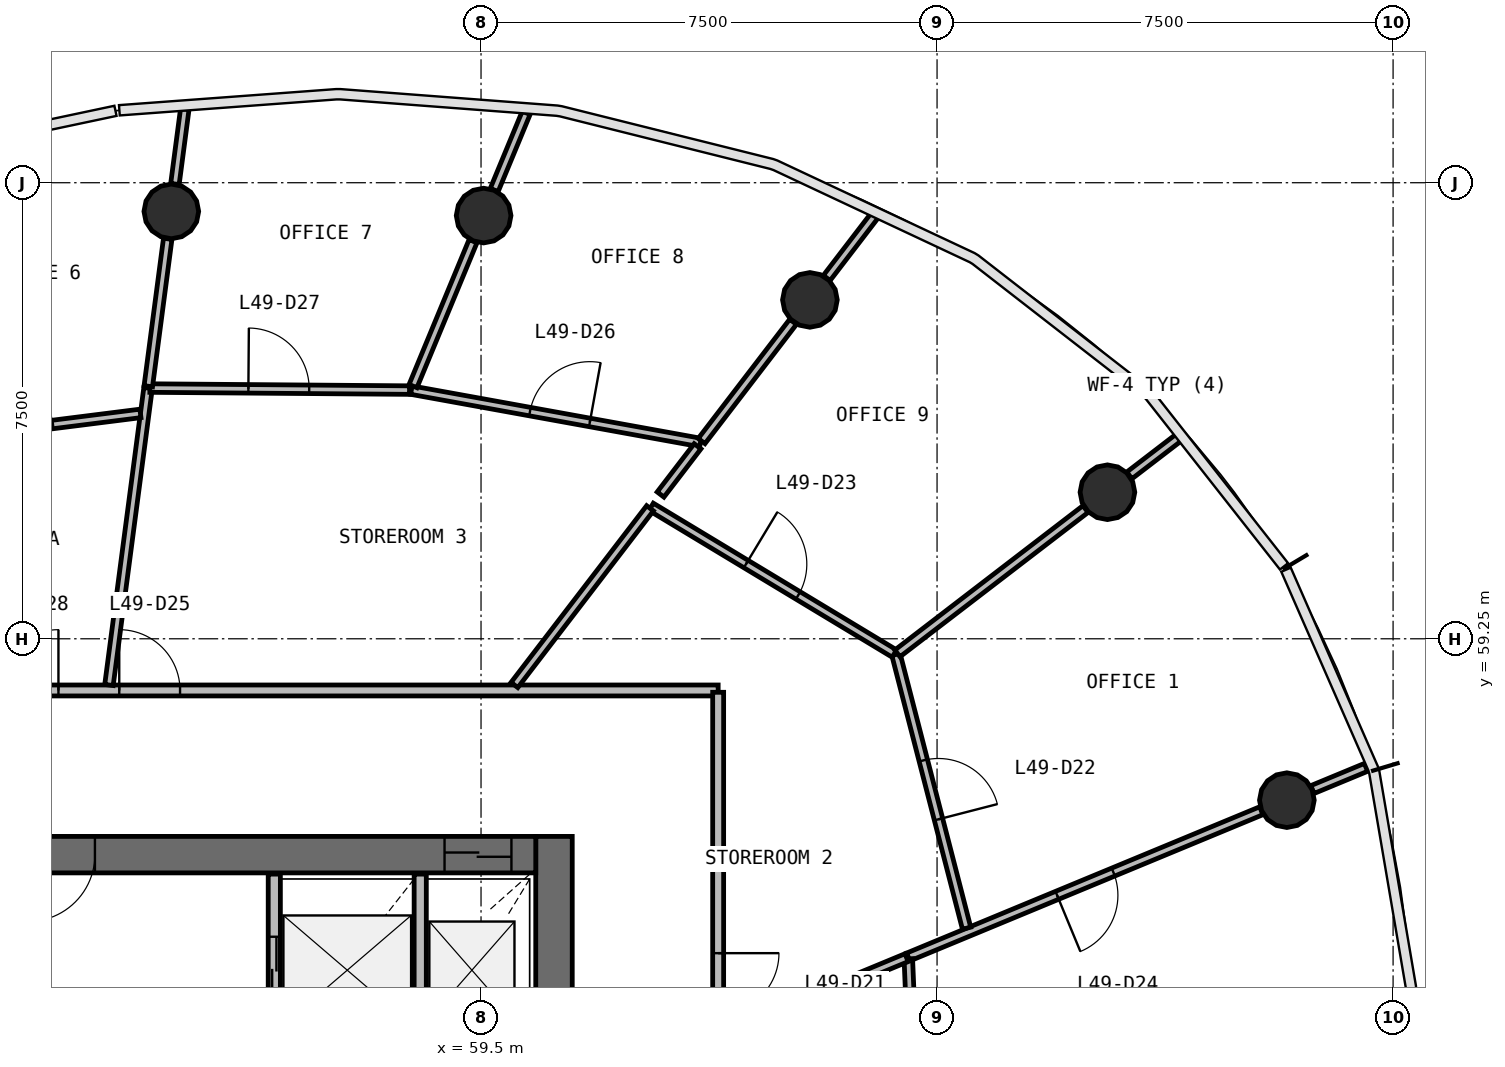
"""IFC4 building model, lengths in metres.
Left out: names, types, materials, properties, quantities, classifications, styles, units other than length and angle.
Written with IfcOpenShell. Run it as: python <this file> out.ifc"""

import sys

from ifc_helpers import new_model, si_unit, direction, frame, frame_2d, origin, origin_2d, place, context, subcontext, project, spatial, rectangle, circle, extrude, source, transform, mapped, element, fill, save


model = new_model("IFC4")
c1 = context("Model", 3, precision=1e-05, world=origin(), true_north=direction((0.0, 1.0)))
c2 = subcontext(c1, "Body", "Model", "MODEL_VIEW")
j1 = project(units=[si_unit("LENGTHUNIT", "METRE"), si_unit("PLANEANGLEUNIT", "RADIAN")], contexts=[c1])
p1 = place(None, origin())
s1 = spatial("IfcSite", under=j1, at=p1, CompositionType="ELEMENT")
p2 = place(p1, origin())
s2 = spatial("IfcBuilding", under=s1, at=p2, CompositionType="ELEMENT")
p3 = place(p2, frame((0.0, 0.0, 203.3)))
s3 = spatial("IfcBuildingStorey", under=s2, at=p3, CompositionType="ELEMENT", Elevation=203.3)
p4 = place(p3, frame((60.7, 40.0, 0.0), z_axis=(0.0, 0.0, 1.0), x_axis=(0.0, 1.0, 0.0)))
e1 = element("IfcWall", 1, at=p4, inside=s3, PredefinedType="SHEAR", context=c2, shape_type="SweptSolid", body=[
    extrude(rectangle(XDim=16.0, YDim=0.6, at=frame_2d((8.0, 0.0))), origin(), (0.0, 0.0, 1.0), 3.9),
])
p5 = place(p4, frame((7.1, 0.0, 0.0)))
e2 = element("IfcOpeningElement", 2, at=p5, cuts=e1, PredefinedType="OPENING", context=c2, shape_type="SweptSolid", body=[
    extrude(rectangle(XDim=1.8, YDim=2.1, at=frame_2d((0.9, 1.05))), frame((0.0, 0.31, 0.0), z_axis=(0.0, -1.0, 0.0), x_axis=(1.0, 0.0, 0.0)), (0.0, 0.0, 1.0), 0.62),
])
p6 = place(p3, frame((60.4, 55.7, 0.0), z_axis=(0.0, 0.0, 1.0), x_axis=(-1.0, 0.0, 0.0)))
e3 = element("IfcWall", 3, at=p6, inside=s3, PredefinedType="SHEAR", context=c2, shape_type="SweptSolid", body=[
    extrude(rectangle(XDim=16.8, YDim=0.6, at=frame_2d((8.4, 0.0))), origin(), (0.0, 0.0, 1.0), 3.9),
])
p7 = place(p6, frame((0.4, 0.0, 0.0)))
e4 = element("IfcOpeningElement", 4, at=p7, cuts=e3, PredefinedType="OPENING", context=c2, shape_type="SweptSolid", body=[
    extrude(rectangle(XDim=1.1, YDim=2.1, at=frame_2d((0.55, 1.05))), frame((0.0, 0.31, 0.0), z_axis=(0.0, -1.0, 0.0), x_axis=(1.0, 0.0, 0.0)), (0.0, 0.0, 1.0), 0.62),
])
p8 = place(p6, frame((10.3, 0.0, 0.0)))
e5 = element("IfcOpeningElement", 5, at=p8, cuts=e3, PredefinedType="OPENING", context=c2, shape_type="SweptSolid", body=[
    extrude(rectangle(XDim=1.2, YDim=2.1, at=frame_2d((0.6, 1.05))), frame((0.0, 0.31, 0.0), z_axis=(0.0, -1.0, 0.0), x_axis=(1.0, 0.0, 0.0)), (0.0, 0.0, 1.0), 0.62),
])
p9 = place(p6, frame((7.25, 0.0, 0.0)))
e6 = element("IfcOpeningElement", 6, at=p9, cuts=e3, PredefinedType="OPENING", context=c2, shape_type="SweptSolid", body=[
    extrude(rectangle(XDim=1.1, YDim=2.1, at=frame_2d((0.55, 1.05))), frame((0.0, 0.31, 0.0), z_axis=(0.0, -1.0, 0.0), x_axis=(1.0, 0.0, 0.0)), (0.0, 0.0, 1.0), 0.62),
])
m1 = source(origin(), c2, "Body", "SweptSolid", [
    extrude(circle(Radius=0.45, at=origin_2d()), origin(), (0.0, 0.0, 1.0), 3.9),
])
for number, where, z_axis, x_axis in (
    (7, (72.753, 56.596, 0.0), (0.0, 0.0, 1.0), (1.0, 0.0, 0.0)),
    (8, (69.802, 61.66, 0.0), (0.0, 0.0, 1.0), (1.0, 0.0, 0.0)),
    (9, (64.909, 64.823, 0.0), (0.0, 0.0, 1.0), (1.0, 0.0, 0.0)),
    (10, (59.543, 66.21, 0.0), (0.0, 0.0, 1.0), (1.0, 0.0, 0.0)),
    (11, (54.406, 66.278, 0.0), (0.0, 0.0, 1.0), (1.0, 0.0, 0.0)),
):
    element("IfcColumn", number, at=place(p3, frame(where, z_axis=z_axis, x_axis=x_axis)), inside=s3, PredefinedType="COLUMN", context=c2, shape_type="MappedRepresentation", body=[
        mapped(m1, transform((0.0, 0.0, 0.0), scale=1.0)),
    ])
p10 = place(p3, frame((56.1, 55.38, 0.0), z_axis=(0.0, 0.0, 1.0), x_axis=(0.0, -1.0, 0.0)))
e12 = element("IfcWall", 12, at=p10, inside=s3, PredefinedType="SOLIDWALL", context=c2, shape_type="SweptSolid", body=[
    extrude(rectangle(XDim=2.98, YDim=0.2, at=frame_2d((1.49, 0.0))), origin(), (0.0, 0.0, 1.0), 3.58),
])
p11 = place(p10, frame((1.03, 0.0, 0.0)))
e13 = element("IfcOpeningElement", 13, at=p11, cuts=e12, PredefinedType="OPENING", context=c2, shape_type="SweptSolid", body=[
    extrude(rectangle(XDim=1.1, YDim=2.1, at=frame_2d((0.55, 1.05))), frame((0.0, 0.11, 0.0), z_axis=(0.0, -1.0, 0.0), x_axis=(1.0, 0.0, 0.0)), (0.0, 0.0, 1.0), 0.22),
])
p12 = place(p3, frame((58.5, 52.4, 0.0), z_axis=(0.0, 0.0, 1.0), x_axis=(0.0, 1.0, 0.0)))
e14 = element("IfcWall", 14, at=p12, inside=s3, PredefinedType="SOLIDWALL", context=c2, shape_type="SweptSolid", body=[
    extrude(rectangle(XDim=2.98, YDim=0.2, at=frame_2d((1.49, 0.0))), origin(), (0.0, 0.0, 1.0), 3.58),
])
p13 = place(p3, frame((40.6, 58.4, 0.0), z_axis=(0.0, 0.0, 1.0), x_axis=(1.0, 0.0, 0.0)))
e15 = element("IfcWall", 15, at=p13, inside=s3, PredefinedType="PARTITIONING", context=c2, shape_type="SweptSolid", body=[
    extrude(rectangle(XDim=22.8, YDim=0.18, at=frame_2d((11.4, 0.0))), origin(), (0.0, 0.0, 1.0), 2.88),
])
p14 = place(p13, frame((12.95, 0.0, 0.0)))
e16 = element("IfcOpeningElement", 16, at=p14, cuts=e15, PredefinedType="OPENING", context=c2, shape_type="SweptSolid", body=[
    extrude(rectangle(XDim=1.0, YDim=2.1, at=frame_2d((0.5, 1.05))), frame((0.0, 0.1, 0.0), z_axis=(0.0, -1.0, 0.0), x_axis=(1.0, 0.0, 0.0)), (0.0, 0.0, 1.0), 0.2),
])
p15 = place(p13, frame((10.95, 0.0, 0.0)))
e17 = element("IfcOpeningElement", 17, at=p15, cuts=e15, PredefinedType="OPENING", context=c2, shape_type="SweptSolid", body=[
    extrude(rectangle(XDim=1.0, YDim=2.1, at=frame_2d((0.5, 1.05))), frame((0.0, 0.1, 0.0), z_axis=(0.0, -1.0, 0.0), x_axis=(1.0, 0.0, 0.0)), (0.0, 0.0, 1.0), 0.2),
])
p16 = place(p3, frame((63.4, 58.37, 0.0), z_axis=(0.0, 0.0, 1.0), x_axis=(0.0, -1.0, 0.0)))
e18 = element("IfcWall", 18, at=p16, inside=s3, PredefinedType="PARTITIONING", context=c2, shape_type="SweptSolid", body=[
    extrude(rectangle(XDim=20.74, YDim=0.18, at=frame_2d((10.37, 0.0))), origin(), (0.0, 0.0, 1.0), 2.88),
])
p17 = place(p16, frame((9.99, 0.0, 0.0)))
e19 = element("IfcOpeningElement", 19, at=p17, cuts=e18, PredefinedType="OPENING", context=c2, shape_type="SweptSolid", body=[
    extrude(rectangle(XDim=0.9, YDim=2.1, at=frame_2d((0.45, 1.05))), frame((0.0, 0.1, 0.0), z_axis=(0.0, -1.0, 0.0), x_axis=(1.0, 0.0, 0.0)), (0.0, 0.0, 1.0), 0.2),
])
p18 = place(p16, frame((7.79, 0.0, 0.0)))
e20 = element("IfcOpeningElement", 20, at=p18, cuts=e18, PredefinedType="OPENING", context=c2, shape_type="SweptSolid", body=[
    extrude(rectangle(XDim=0.9, YDim=2.1, at=frame_2d((0.45, 1.05))), frame((0.0, 0.1, 0.0), z_axis=(0.0, -1.0, 0.0), x_axis=(1.0, 0.0, 0.0)), (0.0, 0.0, 1.0), 0.2),
])
p19 = place(p16, frame((4.29, 0.0, 0.0)))
e21 = element("IfcOpeningElement", 21, at=p19, cuts=e18, PredefinedType="OPENING", context=c2, shape_type="SweptSolid", body=[
    extrude(rectangle(XDim=1.0, YDim=2.1, at=frame_2d((0.5, 1.05))), frame((0.0, 0.1, 0.0), z_axis=(0.0, -1.0, 0.0), x_axis=(1.0, 0.0, 0.0)), (0.0, 0.0, 1.0), 0.2),
])
p20 = place(p16, frame((15.49, 0.0, 0.0)))
e22 = element("IfcOpeningElement", 22, at=p20, cuts=e18, PredefinedType="OPENING", context=c2, shape_type="SweptSolid", body=[
    extrude(rectangle(XDim=1.0, YDim=2.1, at=frame_2d((0.5, 1.05))), frame((0.0, 0.1, 0.0), z_axis=(0.0, -1.0, 0.0), x_axis=(1.0, 0.0, 0.0)), (0.0, 0.0, 1.0), 0.2),
])
p21 = place(p16, frame((12.09, 0.0, 0.0)))
e23 = element("IfcOpeningElement", 23, at=p21, cuts=e18, PredefinedType="OPENING", context=c2, shape_type="SweptSolid", body=[
    extrude(rectangle(XDim=1.0, YDim=2.1, at=frame_2d((0.5, 1.05))), frame((0.0, 0.1, 0.0), z_axis=(0.0, -1.0, 0.0), x_axis=(1.0, 0.0, 0.0)), (0.0, 0.0, 1.0), 0.2),
])
p22 = place(p3, frame((72.333, 56.422, 0.0), z_axis=(0.0, 0.0, 1.0), x_axis=(-0.92388853292, -0.382661702733, 0.0)))
e24 = element("IfcWall", 24, at=p22, inside=s3, PredefinedType="PARTITIONING", context=c2, shape_type="SweptSolid", body=[
    extrude(rectangle(XDim=6.285, YDim=0.14, at=frame_2d((3.143, 0.0))), origin(), (0.0, 0.0, 1.0), 2.88),
])
p23 = place(p22, frame((2.635, 0.0, 0.0)))
e25 = element("IfcOpeningElement", 25, at=p23, cuts=e24, PredefinedType="OPENING", context=c2, shape_type="SweptSolid", body=[
    extrude(rectangle(XDim=1.0, YDim=2.1, at=frame_2d((0.5, 1.05))), frame((0.0, 0.08, 0.0), z_axis=(0.0, -1.0, 0.0), x_axis=(1.0, 0.0, 0.0)), (0.0, 0.0, 1.0), 0.16),
])
p24 = place(p3, frame((53.381, 58.49, 0.0), z_axis=(0.0, 0.0, 1.0), x_axis=(0.130510929427, 0.991446870639, 0.0)))
e26 = element("IfcWall", 26, at=p24, inside=s3, PredefinedType="PARTITIONING", context=c2, shape_type="SweptSolid", body=[
    extrude(rectangle(XDim=4.926, YDim=0.14, at=frame_2d((2.463, 0.0))), origin(), (0.0, 0.0, 1.0), 2.88),
])
p25 = place(p3, frame((58.354, 63.339, 0.0), z_axis=(0.0, 0.0, 1.0), x_axis=(0.983980456021, -0.178276364581, 0.0)))
e27 = element("IfcWall", 27, at=p25, inside=s3, PredefinedType="PARTITIONING", context=c2, shape_type="SweptSolid", body=[
    extrude(rectangle(XDim=4.833, YDim=0.14, at=frame_2d((2.417, 0.0))), origin(), (0.0, 0.0, 1.0), 2.88),
])
p26 = place(p25, frame((1.983, 0.0, 0.0)))
e28 = element("IfcOpeningElement", 28, at=p26, cuts=e27, PredefinedType="OPENING", context=c2, shape_type="SweptSolid", body=[
    extrude(rectangle(XDim=1.0, YDim=2.1, at=frame_2d((0.5, 1.05))), frame((0.0, 0.08, 0.0), z_axis=(0.0, -1.0, 0.0), x_axis=(1.0, 0.0, 0.0)), (0.0, 0.0, 1.0), 0.16),
])
p27 = place(p3, frame((66.324, 58.991, 0.0), z_axis=(0.0, 0.0, 1.0), x_axis=(0.249819251726, -0.968292487561, 0.0)))
e29 = element("IfcWall", 29, at=p27, inside=s3, PredefinedType="PARTITIONING", context=c2, shape_type="SweptSolid", body=[
    extrude(rectangle(XDim=4.649, YDim=0.14, at=frame_2d((2.324, 0.0))), origin(), (0.0, 0.0, 1.0), 2.88),
])
p28 = place(p27, frame((1.799, 0.0, 0.0)))
e30 = element("IfcOpeningElement", 30, at=p28, cuts=e29, PredefinedType="OPENING", context=c2, shape_type="SweptSolid", body=[
    extrude(rectangle(XDim=1.0, YDim=2.1, at=frame_2d((0.5, 1.05))), frame((0.0, 0.08, 0.0), z_axis=(0.0, -1.0, 0.0), x_axis=(1.0, 0.0, 0.0)), (0.0, 0.0, 1.0), 0.16),
])
p29 = place(p3, frame((62.298, 61.42, 0.0), z_axis=(0.0, 0.0, 1.0), x_axis=(0.856310382511, -0.516461546298, 0.0)))
e31 = element("IfcWall", 31, at=p29, inside=s3, PredefinedType="PARTITIONING", context=c2, shape_type="SweptSolid", body=[
    extrude(rectangle(XDim=4.672, YDim=0.14, at=frame_2d((2.336, 0.0))), origin(), (0.0, 0.0, 1.0), 2.88),
])
p30 = place(p29, frame((1.823, 0.0, 0.0)))
e32 = element("IfcOpeningElement", 32, at=p30, cuts=e31, PredefinedType="OPENING", context=c2, shape_type="SweptSolid", body=[
    extrude(rectangle(XDim=1.0, YDim=2.1, at=frame_2d((0.5, 1.05))), frame((0.0, 0.08, 0.0), z_axis=(0.0, -1.0, 0.0), x_axis=(1.0, 0.0, 0.0)), (0.0, 0.0, 1.0), 0.16),
])
p31 = place(p3, frame((54.054, 63.373, 0.0), z_axis=(0.0, 0.0, 1.0), x_axis=(0.999969319587, -0.007833255005, 0.0)))
e33 = element("IfcWall", 33, at=p31, inside=s3, PredefinedType="PARTITIONING", context=c2, shape_type="SweptSolid", body=[
    extrude(rectangle(XDim=4.27, YDim=0.14, at=frame_2d((2.135, 0.0))), origin(), (0.0, 0.0, 1.0), 2.88),
])
p32 = place(p31, frame((1.62, 0.0, 0.0)))
e34 = element("IfcOpeningElement", 34, at=p32, cuts=e33, PredefinedType="OPENING", context=c2, shape_type="SweptSolid", body=[
    extrude(rectangle(XDim=1.0, YDim=2.1, at=frame_2d((0.5, 1.05))), frame((0.0, 0.08, 0.0), z_axis=(0.0, -1.0, 0.0), x_axis=(1.0, 0.0, 0.0)), (0.0, 0.0, 1.0), 0.16),
])
p33 = place(p3, frame((66.696, 49.935, 0.0), z_axis=(0.0, 0.0, 1.0), x_axis=(-0.041535399008, 0.999137032959, 0.0)))
e35 = element("IfcWall", 35, at=p33, inside=s3, PredefinedType="PARTITIONING", context=c2, shape_type="SweptSolid", body=[
    extrude(rectangle(XDim=4.056, YDim=0.14, at=frame_2d((2.028, 0.0))), origin(), (0.0, 0.0, 1.0), 2.88),
])
p34 = place(p3, frame((66.348, 59.01, 0.0), z_axis=(0.0, 0.0, 1.0), x_axis=(0.793347300472, 0.608769300173, 0.0)))
e36 = element("IfcWall", 36, at=p34, inside=s3, PredefinedType="PARTITIONING", context=c2, shape_type="SweptSolid", body=[
    extrude(rectangle(XDim=3.899, YDim=0.14, at=frame_2d((1.95, 0.0))), origin(), (0.0, 0.0, 1.0), 2.88),
])
p35 = place(p3, frame((50.094, 62.476, 0.0), z_axis=(0.0, 0.0, 1.0), x_axis=(0.99213420041, 0.12517878565, 0.0)))
e37 = element("IfcWall", 37, at=p35, inside=s3, PredefinedType="PARTITIONING", context=c2, shape_type="SweptSolid", body=[
    extrude(rectangle(XDim=3.834, YDim=0.14, at=frame_2d((1.917, 0.0))), origin(), (0.0, 0.0, 1.0), 2.88),
])
p36 = place(p35, frame((1.385, 0.0, 0.0)))
e38 = element("IfcOpeningElement", 38, at=p36, cuts=e37, PredefinedType="OPENING", context=c2, shape_type="SweptSolid", body=[
    extrude(rectangle(XDim=1.0, YDim=2.1, at=frame_2d((0.5, 1.05))), frame((0.0, 0.08, 0.0), z_axis=(0.0, -1.0, 0.0), x_axis=(1.0, 0.0, 0.0)), (0.0, 0.0, 1.0), 0.16),
])
p37 = place(p3, frame((60.049, 58.49, 0.0), z_axis=(0.0, 0.0, 1.0), x_axis=(0.60875050296, 0.793361724024, 0.0)))
e39 = element("IfcWall", 39, at=p37, inside=s3, PredefinedType="PARTITIONING", context=c2, shape_type="SweptSolid", body=[
    extrude(rectangle(XDim=3.663, YDim=0.14, at=frame_2d((1.832, 0.0))), origin(), (0.0, 0.0, 1.0), 2.88),
])
p38 = place(p3, frame((62.453, 61.622, 0.0), z_axis=(0.0, 0.0, 1.0), x_axis=(0.608872401912, 0.793268175455, 0.0)))
e40 = element("IfcWall", 40, at=p38, inside=s3, PredefinedType="PARTITIONING", context=c2, shape_type="SweptSolid", body=[
    extrude(rectangle(XDim=1.0, YDim=0.14, at=frame_2d((0.5, 0.0))), origin(), (0.0, 0.0, 1.0), 2.88),
])
p39 = place(p3, frame((63.127, 62.501, 0.0), z_axis=(0.0, 0.0, 1.0), x_axis=(0.608750837214, 0.793361467549, 0.0)))
e41 = element("IfcWall", 41, at=p39, inside=s3, PredefinedType="PARTITIONING", context=c2, shape_type="SweptSolid", body=[
    extrude(rectangle(XDim=2.472, YDim=0.14, at=frame_2d((1.236, 0.0))), origin(), (0.0, 0.0, 1.0), 2.88),
])
p40 = place(p3, frame((63.49, 52.759, 0.0), z_axis=(0.0, 0.0, 1.0), x_axis=(0.923862401464, 0.382724787753, 0.0)))
e42 = element("IfcWall", 42, at=p40, inside=s3, PredefinedType="PARTITIONING", context=c2, shape_type="SweptSolid", body=[
    extrude(rectangle(XDim=3.257, YDim=0.14, at=frame_2d((1.628, 0.0))), origin(), (0.0, 0.0, 1.0), 2.88),
])
p41 = place(p3, frame((54.028, 63.403, 0.0), z_axis=(0.0, 0.0, 1.0), x_axis=(0.130581052229, 0.991437637373, 0.0)))
e43 = element("IfcWall", 43, at=p41, inside=s3, PredefinedType="PARTITIONING", context=c2, shape_type="SweptSolid", body=[
    extrude(rectangle(XDim=2.446, YDim=0.14, at=frame_2d((1.223, 0.0))), origin(), (0.0, 0.0, 1.0), 2.88),
])
p42 = place(p3, frame((58.381, 63.406, 0.0), z_axis=(0.0, 0.0, 1.0), x_axis=(0.382733405642, 0.923858831319, 0.0)))
e44 = element("IfcWall", 44, at=p42, inside=s3, PredefinedType="PARTITIONING", context=c2, shape_type="SweptSolid", body=[
    extrude(rectangle(XDim=2.58, YDim=0.14, at=frame_2d((1.29, 0.0))), origin(), (0.0, 0.0, 1.0), 2.88),
])
p43 = place(p3, frame((59.717, 66.63, 0.0), z_axis=(0.0, 0.0, 1.0), x_axis=(0.382733825207, 0.923858657502, 0.0)))
e45 = element("IfcWall", 45, at=p43, inside=s3, PredefinedType="PARTITIONING", context=c2, shape_type="SweptSolid", body=[
    extrude(rectangle(XDim=1.373, YDim=0.14, at=frame_2d((0.687, 0.0))), origin(), (0.0, 0.0, 1.0), 2.88),
])
p44 = place(p3, frame((65.186, 65.184, 0.0), z_axis=(0.0, 0.0, 1.0), x_axis=(0.608692849826, 0.79340595824, 0.0)))
e46 = element("IfcWall", 46, at=p44, inside=s3, PredefinedType="PARTITIONING", context=c2, shape_type="SweptSolid", body=[
    extrude(rectangle(XDim=1.334, YDim=0.14, at=frame_2d((0.667, 0.0))), origin(), (0.0, 0.0, 1.0), 2.88),
])
p45 = place(p3, frame((54.466, 66.729, 0.0), z_axis=(0.0, 0.0, 1.0), x_axis=(0.130520415919, 0.991445621821, 0.0)))
e47 = element("IfcWall", 47, at=p45, inside=s3, PredefinedType="PARTITIONING", context=c2, shape_type="SweptSolid", body=[
    extrude(rectangle(XDim=1.246, YDim=0.14, at=frame_2d((0.623, 0.0))), origin(), (0.0, 0.0, 1.0), 2.88),
])
p46 = place(p3, frame((70.163, 61.937, 0.0), z_axis=(0.0, 0.0, 1.0), x_axis=(0.793403619358, 0.608695898449, 0.0)))
e48 = element("IfcWall", 48, at=p46, inside=s3, PredefinedType="PARTITIONING", context=c2, shape_type="SweptSolid", body=[
    extrude(rectangle(XDim=1.047, YDim=0.14, at=frame_2d((0.523, 0.0))), origin(), (0.0, 0.0, 1.0), 2.88),
])
p47 = place(p3, frame((73.174, 56.77, 0.0), z_axis=(0.0, 0.0, 1.0), x_axis=(0.923779659408, 0.38292445843, 0.0)))
e49 = element("IfcWall", 49, at=p47, inside=s3, PredefinedType="PARTITIONING", context=c2, shape_type="SweptSolid", body=[
    extrude(rectangle(XDim=0.954, YDim=0.14, at=frame_2d((0.477, 0.0))), origin(), (0.0, 0.0, 1.0), 2.88),
])
m2 = source(origin(), c2, "Body", "SweptSolid", [
    extrude(rectangle(XDim=1.1, YDim=2.1, at=frame_2d((0.55, 1.05))), frame((0.0, 0.025, 0.0), z_axis=(0.0, -1.0, 0.0), x_axis=(1.0, 0.0, 0.0)), (0.0, 0.0, 1.0), 0.05),
])
p48 = place(p11, origin())
e50 = element("IfcDoor", 50, at=p48, inside=s3, OperationType="DOUBLE_DOOR_SLIDING", PredefinedType="USERDEFINED", context=c2, shape_type="MappedRepresentation", body=[
    mapped(m2, transform((0.0, 0.0, 0.0), scale=1.0)),
])
fill(e13, e50)
p49 = place(p7, origin())
e51 = element("IfcDoor", 51, at=p49, inside=s3, OperationType="DOUBLE_DOOR_SLIDING", PredefinedType="USERDEFINED", context=c2, shape_type="MappedRepresentation", body=[
    mapped(m2, transform((0.0, 0.0, 0.0), scale=1.0)),
])
fill(e4, e51)
m3 = source(origin(), c2, "Body", "SweptSolid", [
    extrude(rectangle(XDim=1.1, YDim=2.1, at=frame_2d((0.55, 1.05))), frame((0.0, 0.025, 0.0), z_axis=(0.0, -1.0, 0.0), x_axis=(1.0, 0.0, 0.0)), (0.0, 0.0, 1.0), 0.05),
])
p50 = place(p9, origin())
e52 = element("IfcDoor", 52, at=p50, inside=s3, OperationType="SINGLE_SWING_RIGHT", PredefinedType="DOOR", context=c2, shape_type="MappedRepresentation", body=[
    mapped(m3, transform((0.0, 0.0, 0.0), scale=1.0)),
])
fill(e6, e52)
m4 = source(origin(), c2, "Body", "SweptSolid", [
    extrude(rectangle(XDim=1.0, YDim=2.1, at=frame_2d((0.5, 1.05))), frame((0.0, 0.025, 0.0), z_axis=(0.0, -1.0, 0.0), x_axis=(1.0, 0.0, 0.0)), (0.0, 0.0, 1.0), 0.05),
])
p51 = place(p19, origin())
e53 = element("IfcDoor", 53, at=p51, inside=s3, OperationType="SINGLE_SWING_LEFT", PredefinedType="DOOR", context=c2, shape_type="MappedRepresentation", body=[
    mapped(m4, transform((0.0, 0.0, 0.0), scale=1.0)),
])
fill(e21, e53)
p52 = place(p28, origin())
e54 = element("IfcDoor", 54, at=p52, inside=s3, OperationType="SINGLE_SWING_RIGHT", PredefinedType="DOOR", context=c2, shape_type="MappedRepresentation", body=[
    mapped(m4, transform((0.0, 0.0, 0.0), scale=1.0)),
])
fill(e30, e54)
p53 = place(p30, origin())
e55 = element("IfcDoor", 55, at=p53, inside=s3, OperationType="SINGLE_SWING_LEFT", PredefinedType="DOOR", context=c2, shape_type="MappedRepresentation", body=[
    mapped(m4, transform((0.0, 0.0, 0.0), scale=1.0)),
])
fill(e32, e55)
p54 = place(p23, origin())
e56 = element("IfcDoor", 56, at=p54, inside=s3, OperationType="SINGLE_SWING_RIGHT", PredefinedType="DOOR", context=c2, shape_type="MappedRepresentation", body=[
    mapped(m4, transform((0.0, 0.0, 0.0), scale=1.0)),
])
fill(e25, e56)
p55 = place(p14, origin())
e57 = element("IfcDoor", 57, at=p55, inside=s3, OperationType="SINGLE_SWING_LEFT", PredefinedType="DOOR", context=c2, shape_type="MappedRepresentation", body=[
    mapped(m4, transform((0.0, 0.0, 0.0), scale=1.0)),
])
fill(e16, e57)
p56 = place(p26, origin())
e58 = element("IfcDoor", 58, at=p56, inside=s3, OperationType="SINGLE_SWING_RIGHT", PredefinedType="DOOR", context=c2, shape_type="MappedRepresentation", body=[
    mapped(m4, transform((0.0, 0.0, 0.0), scale=1.0)),
])
fill(e28, e58)
p57 = place(p32, origin())
e59 = element("IfcDoor", 59, at=p57, inside=s3, OperationType="SINGLE_SWING_LEFT", PredefinedType="DOOR", context=c2, shape_type="MappedRepresentation", body=[
    mapped(m4, transform((0.0, 0.0, 0.0), scale=1.0)),
])
fill(e34, e59)
p58 = place(p15, origin())
e60 = element("IfcDoor", 60, at=p58, inside=s3, OperationType="SINGLE_SWING_RIGHT", PredefinedType="DOOR", context=c2, shape_type="MappedRepresentation", body=[
    mapped(m4, transform((0.0, 0.0, 0.0), scale=1.0)),
])
fill(e17, e60)
p59 = place(p36, origin())
e61 = element("IfcDoor", 61, at=p59, inside=s3, OperationType="SINGLE_SWING_LEFT", PredefinedType="DOOR", context=c2, shape_type="MappedRepresentation", body=[
    mapped(m4, transform((0.0, 0.0, 0.0), scale=1.0)),
])
fill(e38, e61)
save(model, sys.argv[1])
